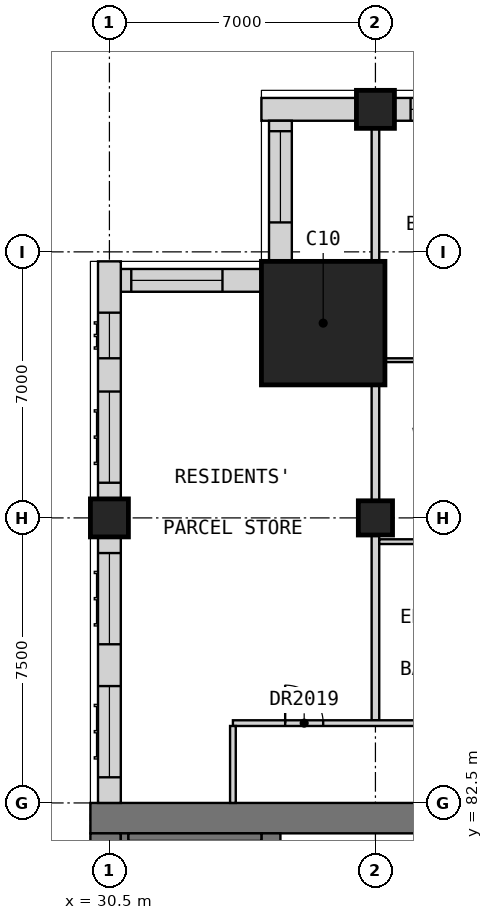
"""IFC4 building model, lengths in metres.
Left out: names, types, materials, properties, quantities, classifications, styles, units other than length and angle.
Written with IfcOpenShell. Run it as: python <this file> out.ifc"""

import sys

from ifc_helpers import new_model, si_unit, direction, frame, frame_2d, origin, origin_2d, place, context, subcontext, project, spatial, rectangle, extrude, element, fill, save


model = new_model("IFC4")
c1 = context("Model", 3, precision=1e-05, world=origin(), true_north=direction((0.0, 1.0)))
c2 = subcontext(c1, "Body", "Model", "MODEL_VIEW")
j1 = project(units=[si_unit("LENGTHUNIT", "METRE"), si_unit("PLANEANGLEUNIT", "RADIAN")], contexts=[c1])
p1 = place(None, origin())
s1 = spatial("IfcSite", under=j1, at=p1, CompositionType="ELEMENT")
p2 = place(p1, origin())
s2 = spatial("IfcBuilding", under=s1, at=p2, CompositionType="ELEMENT")
p3 = place(p2, frame((0.0, 0.0, 210.7)))
s3 = spatial("IfcBuildingStorey", under=s2, at=p3, CompositionType="ELEMENT", Elevation=210.7)
for number, where, z_axis, x_axis in (
    (1, (37.5, 100.75, 0.0), (0.0, 0.0, 1.0), (1.0, 0.0, 0.0)),
    (2, (30.5, 90.0, 0.0), (0.0, 0.0, 1.0), (1.0, 0.0, 0.0)),
):
    element("IfcColumn", number, at=place(p3, frame(where, z_axis=z_axis, x_axis=x_axis)), inside=s3, PredefinedType="COLUMN", context=c2, shape_type="SweptSolid", body=[
        extrude(rectangle(XDim=1.0, YDim=1.0, at=origin_2d()), origin(), (0.0, 0.0, 1.0), 3.5),
    ])
p4 = place(p3, frame((37.5, 90.0, 0.0), z_axis=(0.0, 0.0, 1.0), x_axis=(1.0, 0.0, 0.0)))
e3 = element("IfcColumn", 3, at=p4, inside=s3, PredefinedType="COLUMN", context=c2, shape_type="SweptSolid", body=[
    extrude(rectangle(XDim=0.9, YDim=0.9, at=origin_2d()), origin(), (0.0, 0.0, 1.0), 3.5),
])
p5 = place(p3, frame((36.125, 95.125, 0.0), z_axis=(0.0, 0.0, 1.0), x_axis=(1.0, 0.0, 0.0)))
e4 = element("IfcColumn", 4, at=p5, inside=s3, PredefinedType="COLUMN", context=c2, shape_type="SweptSolid", body=[
    extrude(rectangle(XDim=3.25, YDim=3.25, at=origin_2d()), origin(), (0.0, 0.0, 1.0), 3.5),
])
p6 = place(p3, frame((30.0, 82.1, 0.0), z_axis=(0.0, 0.0, 1.0), x_axis=(1.0, 0.0, 0.0)))
e5 = element("IfcWall", 5, at=p6, inside=s3, PredefinedType="SHEAR", context=c2, shape_type="SweptSolid", body=[
    extrude(rectangle(XDim=30.0, YDim=0.8, at=frame_2d((15.0, 0.0))), origin(), (0.0, 0.0, 1.0), 3.5),
])
p7 = place(p3, frame((30.4, 60.8, 0.0), z_axis=(0.0, 0.0, 1.0), x_axis=(0.0, 1.0, 0.0)))
e6 = element("IfcWall", 6, at=p7, inside=s3, PredefinedType="SHEAR", context=c2, shape_type="SweptSolid", body=[
    extrude(rectangle(XDim=20.9, YDim=0.8, at=frame_2d((10.45, 0.0))), origin(), (0.0, 0.0, 1.0), 3.5),
])
p8 = place(p3, frame((34.75, 78.3, 0.0), z_axis=(0.0, 0.0, 1.0), x_axis=(0.0, 1.0, 0.0)))
e7 = element("IfcWall", 7, at=p8, inside=s3, PredefinedType="SHEAR", context=c2, shape_type="SweptSolid", body=[
    extrude(rectangle(XDim=3.4, YDim=0.5, at=frame_2d((1.7, 0.0))), origin(), (0.0, 0.0, 1.0), 3.5),
])
p9 = place(p3, frame((44.5, 100.75, 0.0), z_axis=(0.0, 0.0, 1.0), x_axis=(-1.0, 0.0, 0.0)))
e8 = element("IfcWall", 8, at=p9, inside=s3, PredefinedType="SOLIDWALL", context=c2, shape_type="SweptSolid", body=[
    extrude(rectangle(XDim=6.5, YDim=0.6, at=frame_2d((3.25, 0.0))), origin(), (0.0, 0.0, 1.0), 2.75),
])
p10 = place(p9, frame((3.675, 0.0, 0.8)))
e9 = element("IfcOpeningElement", 9, at=p10, cuts=e8, PredefinedType="OPENING", context=c2, shape_type="SweptSolid", body=[
    extrude(rectangle(XDim=2.4, YDim=1.8, at=frame_2d((1.2, 0.9))), frame((0.0, 0.31, 0.0), z_axis=(0.0, -1.0, 0.0), x_axis=(1.0, 0.0, 0.0)), (0.0, 0.0, 1.0), 0.62),
])
p11 = place(p9, frame((0.425, 0.0, 0.8)))
e10 = element("IfcOpeningElement", 10, at=p11, cuts=e8, PredefinedType="OPENING", context=c2, shape_type="SweptSolid", body=[
    extrude(rectangle(XDim=2.4, YDim=1.8, at=frame_2d((1.2, 0.9))), frame((0.0, 0.31, 0.0), z_axis=(0.0, -1.0, 0.0), x_axis=(1.0, 0.0, 0.0)), (0.0, 0.0, 1.0), 0.62),
])
p12 = place(p3, frame((37.0, 100.75, 0.0), z_axis=(0.0, 0.0, 1.0), x_axis=(-1.0, 0.0, 0.0)))
e11 = element("IfcWall", 11, at=p12, inside=s3, PredefinedType="SOLIDWALL", context=c2, shape_type="SweptSolid", body=[
    extrude(rectangle(XDim=2.5, YDim=0.6, at=frame_2d((1.25, 0.0))), origin(), (0.0, 0.0, 1.0), 3.1),
])
p13 = place(p3, frame((35.0, 100.45, 0.0), z_axis=(0.0, 0.0, 1.0), x_axis=(0.0, -1.0, 0.0)))
e12 = element("IfcWall", 12, at=p13, inside=s3, PredefinedType="SOLIDWALL", context=c2, shape_type="SweptSolid", body=[
    extrude(rectangle(XDim=3.7, YDim=0.6, at=frame_2d((1.85, 0.0))), origin(), (0.0, 0.0, 1.0), 3.1),
])
p14 = place(p13, frame((0.275, 0.0, 0.8)))
e13 = element("IfcOpeningElement", 13, at=p14, cuts=e12, PredefinedType="OPENING", context=c2, shape_type="SweptSolid", body=[
    extrude(rectangle(XDim=2.4, YDim=1.8, at=frame_2d((1.2, 0.9))), frame((0.0, 0.31, 0.0), z_axis=(0.0, -1.0, 0.0), x_axis=(1.0, 0.0, 0.0)), (0.0, 0.0, 1.0), 0.62),
])
p15 = place(p3, frame((34.5, 96.25, 0.0), z_axis=(0.0, 0.0, 1.0), x_axis=(-1.0, 0.0, 0.0)))
e14 = element("IfcWall", 14, at=p15, inside=s3, PredefinedType="SOLIDWALL", context=c2, shape_type="SweptSolid", body=[
    extrude(rectangle(XDim=3.7, YDim=0.6, at=frame_2d((1.85, 0.0))), origin(), (0.0, 0.0, 1.0), 3.1),
])
p16 = place(p15, frame((1.025, 0.0, 0.8)))
e15 = element("IfcOpeningElement", 15, at=p16, cuts=e14, PredefinedType="OPENING", context=c2, shape_type="SweptSolid", body=[
    extrude(rectangle(XDim=2.4, YDim=1.8, at=frame_2d((1.2, 0.9))), frame((0.0, 0.31, 0.0), z_axis=(0.0, -1.0, 0.0), x_axis=(1.0, 0.0, 0.0)), (0.0, 0.0, 1.0), 0.62),
])
p17 = place(p3, frame((30.5, 96.75, 0.0), z_axis=(0.0, 0.0, 1.0), x_axis=(0.0, -1.0, 0.0)))
e16 = element("IfcWall", 16, at=p17, inside=s3, PredefinedType="SOLIDWALL", context=c2, shape_type="SweptSolid", body=[
    extrude(rectangle(XDim=6.25, YDim=0.6, at=frame_2d((3.125, 0.0))), origin(), (0.0, 0.0, 1.0), 2.75),
])
p18 = place(p17, frame((3.425, 0.0, 0.8)))
e17 = element("IfcOpeningElement", 17, at=p18, cuts=e16, PredefinedType="OPENING", context=c2, shape_type="SweptSolid", body=[
    extrude(rectangle(XDim=2.4, YDim=1.8, at=frame_2d((1.2, 0.9))), frame((0.0, 0.31, 0.0), z_axis=(0.0, -1.0, 0.0), x_axis=(1.0, 0.0, 0.0)), (0.0, 0.0, 1.0), 0.62),
])
p19 = place(p17, frame((1.35, 0.0, 0.8)))
e18 = element("IfcOpeningElement", 18, at=p19, cuts=e16, PredefinedType="OPENING", context=c2, shape_type="SweptSolid", body=[
    extrude(rectangle(XDim=1.2, YDim=1.8, at=frame_2d((0.6, 0.9))), frame((0.0, 0.31, 0.0), z_axis=(0.0, -1.0, 0.0), x_axis=(1.0, 0.0, 0.0)), (0.0, 0.0, 1.0), 0.62),
])
p20 = place(p3, frame((30.5, 89.5, 0.0), z_axis=(0.0, 0.0, 1.0), x_axis=(0.0, -1.0, 0.0)))
e19 = element("IfcWall", 19, at=p20, inside=s3, PredefinedType="SOLIDWALL", context=c2, shape_type="SweptSolid", body=[
    extrude(rectangle(XDim=7.0, YDim=0.6, at=frame_2d((3.5, 0.0))), origin(), (0.0, 0.0, 1.0), 3.1),
])
p21 = place(p20, frame((3.925, 0.0, 0.8)))
e20 = element("IfcOpeningElement", 20, at=p21, cuts=e19, PredefinedType="OPENING", context=c2, shape_type="SweptSolid", body=[
    extrude(rectangle(XDim=2.4, YDim=1.8, at=frame_2d((1.2, 0.9))), frame((0.0, 0.31, 0.0), z_axis=(0.0, -1.0, 0.0), x_axis=(1.0, 0.0, 0.0)), (0.0, 0.0, 1.0), 0.62),
])
p22 = place(p20, frame((0.425, 0.0, 0.8)))
e21 = element("IfcOpeningElement", 21, at=p22, cuts=e19, PredefinedType="OPENING", context=c2, shape_type="SweptSolid", body=[
    extrude(rectangle(XDim=2.4, YDim=1.8, at=frame_2d((1.2, 0.9))), frame((0.0, 0.31, 0.0), z_axis=(0.0, -1.0, 0.0), x_axis=(1.0, 0.0, 0.0)), (0.0, 0.0, 1.0), 0.62),
])
p23 = place(p3, frame((30.9, 60.8, 0.0), z_axis=(0.0, 0.0, 1.0), x_axis=(0.0, 1.0, 0.0)))
e22 = element("IfcWall", 22, at=p23, inside=s3, PredefinedType="SOLIDWALL", context=c2, shape_type="SweptSolid", body=[
    extrude(rectangle(XDim=20.9, YDim=0.2, at=frame_2d((10.45, 0.0))), origin(), (0.0, 0.0, 1.0), 3.09),
])
p24 = place(p3, frame((31.0, 81.6, 0.0), z_axis=(0.0, 0.0, 1.0), x_axis=(1.0, 0.0, 0.0)))
e23 = element("IfcWall", 23, at=p24, inside=s3, PredefinedType="SOLIDWALL", context=c2, shape_type="SweptSolid", body=[
    extrude(rectangle(XDim=3.5, YDim=0.2, at=frame_2d((1.75, 0.0))), origin(), (0.0, 0.0, 1.0), 3.09),
])
p25 = place(p3, frame((37.5, 84.675, 0.0), z_axis=(0.0, 0.0, 1.0), x_axis=(0.0, 1.0, 0.0)))
e24 = element("IfcWall", 24, at=p25, inside=s3, PredefinedType="PARTITIONING", context=c2, shape_type="SweptSolid", body=[
    extrude(rectangle(XDim=16.575, YDim=0.2, at=frame_2d((8.288, 0.0))), origin(), (0.0, 0.0, 1.0), 2.75),
])
p26 = place(p3, frame((33.75, 84.6, 0.0), z_axis=(0.0, 0.0, 1.0), x_axis=(1.0, 0.0, 0.0)))
e25 = element("IfcWall", 25, at=p26, inside=s3, PredefinedType="PARTITIONING", context=c2, shape_type="SweptSolid", body=[
    extrude(rectangle(XDim=28.35, YDim=0.15, at=frame_2d((14.175, 0.0))), origin(), (0.0, 0.0, 1.0), 3.1),
])
p27 = place(p26, frame((1.375, 0.0, 0.0)))
e26 = element("IfcOpeningElement", 26, at=p27, cuts=e25, PredefinedType="OPENING", context=c2, shape_type="SweptSolid", body=[
    extrude(rectangle(XDim=1.0, YDim=2.1, at=frame_2d((0.5, 1.05))), frame((0.0, 0.085, 0.0), z_axis=(0.0, -1.0, 0.0), x_axis=(1.0, 0.0, 0.0)), (0.0, 0.0, 1.0), 0.17),
])
p28 = place(p26, frame((8.925, 0.0, 0.0)))
e27 = element("IfcOpeningElement", 27, at=p28, cuts=e25, PredefinedType="OPENING", context=c2, shape_type="SweptSolid", body=[
    extrude(rectangle(XDim=0.9, YDim=2.1, at=frame_2d((0.45, 1.05))), frame((0.0, 0.085, 0.0), z_axis=(0.0, -1.0, 0.0), x_axis=(1.0, 0.0, 0.0)), (0.0, 0.0, 1.0), 0.17),
])
p29 = place(p26, frame((16.425, 0.0, 0.0)))
e28 = element("IfcOpeningElement", 28, at=p29, cuts=e25, PredefinedType="OPENING", context=c2, shape_type="SweptSolid", body=[
    extrude(rectangle(XDim=0.9, YDim=2.1, at=frame_2d((0.45, 1.05))), frame((0.0, 0.085, 0.0), z_axis=(0.0, -1.0, 0.0), x_axis=(1.0, 0.0, 0.0)), (0.0, 0.0, 1.0), 0.17),
])
p30 = place(p3, frame((33.75, 82.5, 0.0), z_axis=(0.0, 0.0, 1.0), x_axis=(0.0, 1.0, 0.0)))
e29 = element("IfcWall", 29, at=p30, inside=s3, PredefinedType="PARTITIONING", context=c2, shape_type="SweptSolid", body=[
    extrude(rectangle(XDim=2.025, YDim=0.15, at=frame_2d((1.012, 0.0))), origin(), (0.0, 0.0, 1.0), 3.1),
])
p31 = place(p3, frame((37.6, 94.15, 0.0), z_axis=(0.0, 0.0, 1.0), x_axis=(1.0, 0.0, 0.0)))
e30 = element("IfcWall", 30, at=p31, inside=s3, PredefinedType="PARTITIONING", context=c2, shape_type="SweptSolid", body=[
    extrude(rectangle(XDim=22.3, YDim=0.1, at=frame_2d((11.15, 0.0))), origin(), (0.0, 0.0, 1.0), 3.1),
])
p32 = place(p31, frame((1.325, 0.0, 0.0)))
e31 = element("IfcOpeningElement", 31, at=p32, cuts=e30, PredefinedType="OPENING", context=c2, shape_type="SweptSolid", body=[
    extrude(rectangle(XDim=0.9, YDim=2.1, at=frame_2d((0.45, 1.05))), frame((0.0, 0.06, 0.0), z_axis=(0.0, -1.0, 0.0), x_axis=(1.0, 0.0, 0.0)), (0.0, 0.0, 1.0), 0.12),
])
p33 = place(p31, frame((5.075, 0.0, 0.0)))
e32 = element("IfcOpeningElement", 32, at=p33, cuts=e30, PredefinedType="OPENING", context=c2, shape_type="SweptSolid", body=[
    extrude(rectangle(XDim=0.9, YDim=2.1, at=frame_2d((0.45, 1.05))), frame((0.0, 0.06, 0.0), z_axis=(0.0, -1.0, 0.0), x_axis=(1.0, 0.0, 0.0)), (0.0, 0.0, 1.0), 0.12),
])
p34 = place(p31, frame((12.575, 0.0, 0.0)))
e33 = element("IfcOpeningElement", 33, at=p34, cuts=e30, PredefinedType="OPENING", context=c2, shape_type="SweptSolid", body=[
    extrude(rectangle(XDim=0.9, YDim=2.1, at=frame_2d((0.45, 1.05))), frame((0.0, 0.06, 0.0), z_axis=(0.0, -1.0, 0.0), x_axis=(1.0, 0.0, 0.0)), (0.0, 0.0, 1.0), 0.12),
])
p35 = place(p31, frame((20.075, 0.0, 0.0)))
e34 = element("IfcOpeningElement", 34, at=p35, cuts=e30, PredefinedType="OPENING", context=c2, shape_type="SweptSolid", body=[
    extrude(rectangle(XDim=0.9, YDim=2.1, at=frame_2d((0.45, 1.05))), frame((0.0, 0.06, 0.0), z_axis=(0.0, -1.0, 0.0), x_axis=(1.0, 0.0, 0.0)), (0.0, 0.0, 1.0), 0.12),
])
p36 = place(p3, frame((37.6, 89.375, 0.0), z_axis=(0.0, 0.0, 1.0), x_axis=(1.0, 0.0, 0.0)))
e35 = element("IfcWall", 35, at=p36, inside=s3, PredefinedType="PARTITIONING", context=c2, shape_type="SweptSolid", body=[
    extrude(rectangle(XDim=3.65, YDim=0.125, at=frame_2d((1.825, 0.0))), origin(), (0.0, 0.0, 1.0), 3.1),
])
p37 = place(p36, frame((1.325, 0.0, 0.0)))
e36 = element("IfcOpeningElement", 36, at=p37, cuts=e35, PredefinedType="OPENING", context=c2, shape_type="SweptSolid", body=[
    extrude(rectangle(XDim=0.9, YDim=2.1, at=frame_2d((0.45, 1.05))), frame((0.0, 0.073, 0.0), z_axis=(0.0, -1.0, 0.0), x_axis=(1.0, 0.0, 0.0)), (0.0, 0.0, 1.0), 0.145),
])
p38 = place(p10, origin())
e37 = element("IfcWindow", 37, at=p38, inside=s3, PartitioningType="SINGLE_PANEL", PredefinedType="WINDOW", context=c2, shape_type="SweptSolid", body=[
    extrude(rectangle(XDim=2.4, YDim=1.8, at=frame_2d((1.2, 0.9))), frame((0.0, -0.07, 0.0), z_axis=(0.0, -1.0, 0.0), x_axis=(1.0, 0.0, 0.0)), (0.0, 0.0, 1.0), 0.06),
])
fill(e9, e37)
p39 = place(p14, origin())
e38 = element("IfcWindow", 38, at=p39, inside=s3, PartitioningType="SINGLE_PANEL", PredefinedType="WINDOW", context=c2, shape_type="SweptSolid", body=[
    extrude(rectangle(XDim=2.4, YDim=1.8, at=frame_2d((1.2, 0.9))), frame((0.0, -0.07, 0.0), z_axis=(0.0, -1.0, 0.0), x_axis=(1.0, 0.0, 0.0)), (0.0, 0.0, 1.0), 0.06),
])
fill(e13, e38)
p40 = place(p16, origin())
e39 = element("IfcWindow", 39, at=p40, inside=s3, PartitioningType="SINGLE_PANEL", PredefinedType="WINDOW", context=c2, shape_type="SweptSolid", body=[
    extrude(rectangle(XDim=2.4, YDim=1.8, at=frame_2d((1.2, 0.9))), frame((0.0, -0.07, 0.0), z_axis=(0.0, -1.0, 0.0), x_axis=(1.0, 0.0, 0.0)), (0.0, 0.0, 1.0), 0.06),
])
fill(e15, e39)
p41 = place(p18, origin())
e40 = element("IfcWindow", 40, at=p41, inside=s3, PartitioningType="SINGLE_PANEL", PredefinedType="WINDOW", context=c2, shape_type="SweptSolid", body=[
    extrude(rectangle(XDim=2.4, YDim=1.8, at=frame_2d((1.2, 0.9))), frame((0.0, -0.07, 0.0), z_axis=(0.0, -1.0, 0.0), x_axis=(1.0, 0.0, 0.0)), (0.0, 0.0, 1.0), 0.06),
])
fill(e17, e40)
p42 = place(p19, origin())
e41 = element("IfcWindow", 41, at=p42, inside=s3, PartitioningType="SINGLE_PANEL", PredefinedType="WINDOW", context=c2, shape_type="SweptSolid", body=[
    extrude(rectangle(XDim=1.2, YDim=1.8, at=frame_2d((0.6, 0.9))), frame((0.0, -0.07, 0.0), z_axis=(0.0, -1.0, 0.0), x_axis=(1.0, 0.0, 0.0)), (0.0, 0.0, 1.0), 0.06),
])
fill(e18, e41)
p43 = place(p21, origin())
e42 = element("IfcWindow", 42, at=p43, inside=s3, PartitioningType="SINGLE_PANEL", PredefinedType="WINDOW", context=c2, shape_type="SweptSolid", body=[
    extrude(rectangle(XDim=2.4, YDim=1.8, at=frame_2d((1.2, 0.9))), frame((0.0, -0.07, 0.0), z_axis=(0.0, -1.0, 0.0), x_axis=(1.0, 0.0, 0.0)), (0.0, 0.0, 1.0), 0.06),
])
fill(e20, e42)
p44 = place(p22, origin())
e43 = element("IfcWindow", 43, at=p44, inside=s3, PartitioningType="SINGLE_PANEL", PredefinedType="WINDOW", context=c2, shape_type="SweptSolid", body=[
    extrude(rectangle(XDim=2.4, YDim=1.8, at=frame_2d((1.2, 0.9))), frame((0.0, -0.07, 0.0), z_axis=(0.0, -1.0, 0.0), x_axis=(1.0, 0.0, 0.0)), (0.0, 0.0, 1.0), 0.06),
])
fill(e21, e43)
p45 = place(p27, origin())
e44 = element("IfcDoor", 44, at=p45, inside=s3, OperationType="SINGLE_SWING_LEFT", PredefinedType="DOOR", context=c2, shape_type="SweptSolid", body=[
    extrude(rectangle(XDim=1.0, YDim=2.1, at=frame_2d((0.5, 1.05))), frame((0.0, 0.025, 0.0), z_axis=(0.0, -1.0, 0.0), x_axis=(1.0, 0.0, 0.0)), (0.0, 0.0, 1.0), 0.05),
])
fill(e26, e44)
save(model, sys.argv[1])
